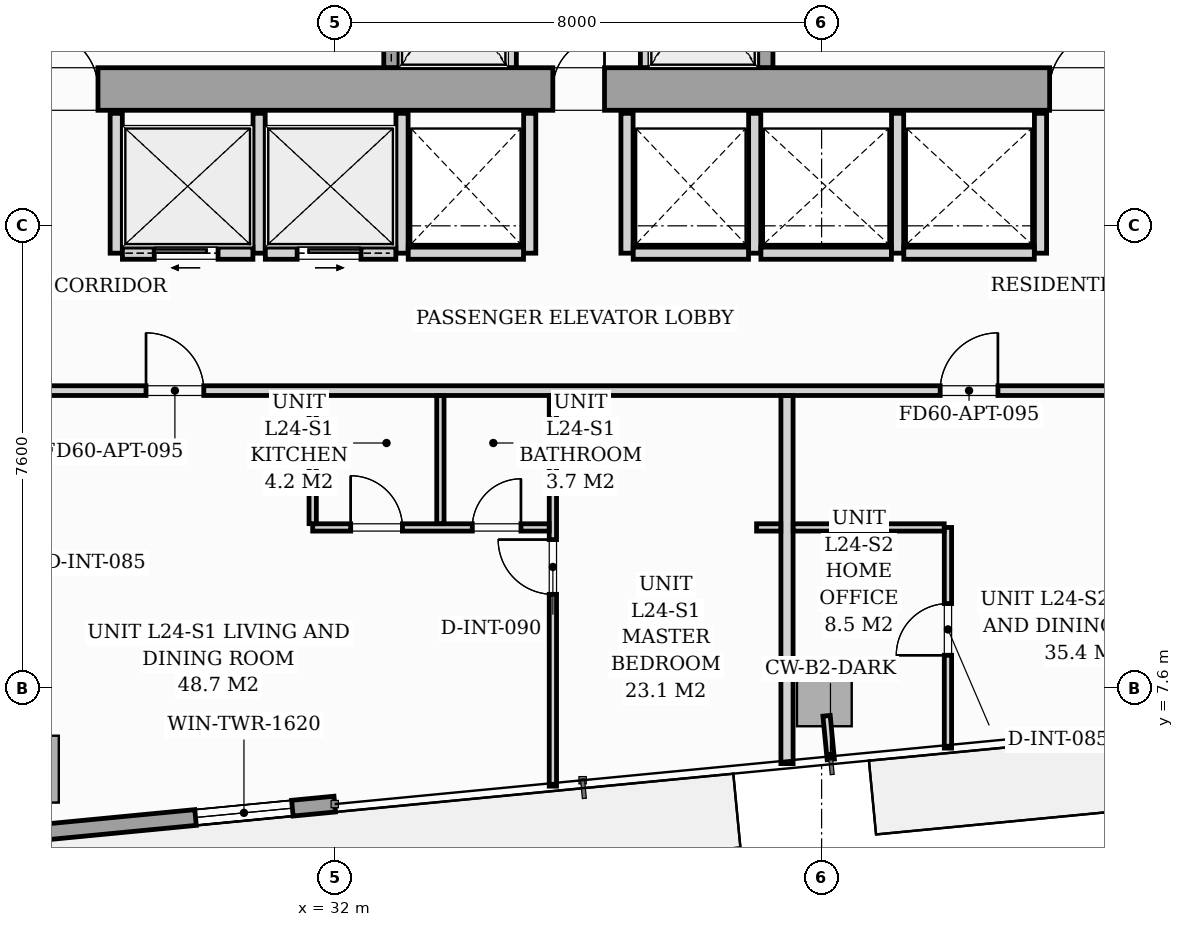
"""IFC4 building model, lengths in metres.
Left out: names, types, materials, properties, quantities, classifications, styles, units other than length and angle.
Written with IfcOpenShell. Run it as: python <this file> out.ifc"""

import sys

from ifc_helpers import new_model, si_unit, direction, frame, frame_2d, origin, origin_2d, place, context, subcontext, project, spatial, rectangle, i_section, extrude, source, transform, mapped, element, fill, save


model = new_model("IFC4")
c1 = context("Model", 3, precision=1e-05, world=origin(), true_north=direction((0.0, 1.0)))
c2 = subcontext(c1, "Body", "Model", "MODEL_VIEW")
j1 = project(units=[si_unit("LENGTHUNIT", "METRE"), si_unit("PLANEANGLEUNIT", "RADIAN")], contexts=[c1])
p1 = place(None, origin())
s1 = spatial("IfcSite", under=j1, at=p1, CompositionType="ELEMENT")
p2 = place(p1, origin())
s2 = spatial("IfcBuilding", under=s1, at=p2, CompositionType="ELEMENT")
p3 = place(p2, frame((0.0, 0.0, 87.4)))
s3 = spatial("IfcBuildingStorey", under=s2, at=p3, CompositionType="ELEMENT", Elevation=87.4)
m1 = source(origin(), c2, "Body", "SweptSolid", [
    extrude(i_section(OverallWidth=0.427, OverallDepth=0.483, WebThickness=0.051, FlangeThickness=0.082, FilletRadius=0.018, at=origin_2d()), origin(), (0.0, 0.0, 1.0), 3.196),
])
for number, where, z_axis, x_axis in (
    (1, (33.12, 17.4, 0.002), (0.0, 0.0, 1.0), (1.0, 0.0, 0.0)),
    (2, (38.88, 17.4, 0.002), (0.0, 0.0, 1.0), (1.0, 0.0, 0.0)),
):
    element("IfcColumn", number, at=place(p3, frame(where, z_axis=z_axis, x_axis=x_axis)), inside=s3, PredefinedType="PILASTER", context=c2, shape_type="MappedRepresentation", body=[
        mapped(m1, transform((0.0, 0.0, 0.0), scale=1.0)),
    ])
m2 = source(origin(), c2, "Body", "SweptSolid", [
    extrude(rectangle(XDim=0.9, YDim=1.1, at=origin_2d()), origin(), (0.0, 0.0, 1.0), 3.196),
])
for number, where, z_axis, x_axis in (
    (3, (27.006, 6.265, 0.002), (0.0, 0.0, 1.0), (0.995, 0.096, 0.0)),
    (4, (40.045, 7.521, 0.002), (0.0, 0.0, 1.0), (0.995, 0.096, 0.0)),
):
    element("IfcColumn", number, at=place(p3, frame(where, z_axis=z_axis, x_axis=x_axis)), inside=s3, PredefinedType="COLUMN", context=c2, shape_type="MappedRepresentation", body=[
        mapped(m2, transform((0.0, 0.0, 0.0), scale=1.0)),
    ])
p4 = place(p3, frame((31.994, 5.69, 0.0), z_axis=(0.0, 0.0, 1.0), x_axis=(-0.995396521236, -0.095842399342, 0.0)))
e5 = element("IfcWall", 5, at=p4, inside=s3, PredefinedType="STANDARD", context=c2, shape_type="SweptSolid", body=[
    extrude(rectangle(XDim=19.11, YDim=0.26, at=frame_2d((9.555, 0.0))), origin(), (0.0, 0.0, 1.0), 2.94),
])
p5 = place(p4, frame((7.49, 0.0, 0.0)))
e6 = element("IfcOpeningElement", 6, at=p5, cuts=e5, PredefinedType="OPENING", context=c2, shape_type="SweptSolid", body=[
    extrude(rectangle(XDim=1.8, YDim=2.06, at=frame_2d((0.9, 1.03))), frame((0.0, 0.14, 0.0), z_axis=(0.0, -1.0, 0.0), x_axis=(1.0, 0.0, 0.0)), (0.0, 0.0, 1.0), 0.28),
])
p6 = place(p4, frame((0.7, 0.0, 0.65)))
e7 = element("IfcOpeningElement", 7, at=p6, cuts=e5, PredefinedType="OPENING", context=c2, shape_type="SweptSolid", body=[
    extrude(rectangle(XDim=1.6, YDim=1.5, at=frame_2d((0.8, 0.75))), frame((0.0, 0.14, 0.0), z_axis=(0.0, -1.0, 0.0), x_axis=(1.0, 0.0, 0.0)), (0.0, 0.0, 1.0), 0.28),
])
p7 = place(p3, frame((26.1, 17.45, 0.0), z_axis=(0.0, 0.0, 1.0), x_axis=(1.0, 0.0, 0.0)))
e8 = element("IfcWall", 8, at=p7, inside=s3, PredefinedType="SHEAR", context=c2, shape_type="SweptSolid", body=[
    extrude(rectangle(XDim=19.8, YDim=0.7, at=frame_2d((9.9, 0.0))), origin(), (0.0, 0.0, 1.0), 3.2),
])
p8 = place(p7, frame((1.05, 0.0, 0.0)))
e9 = element("IfcOpeningElement", 9, at=p8, cuts=e8, PredefinedType="OPENING", context=c2, shape_type="SweptSolid", body=[
    extrude(rectangle(XDim=0.95, YDim=2.06, at=frame_2d((0.475, 1.03))), frame((0.0, 0.36, 0.0), z_axis=(0.0, -1.0, 0.0), x_axis=(1.0, 0.0, 0.0)), (0.0, 0.0, 1.0), 0.72),
])
p9 = place(p7, frame((9.48, 0.0, 0.0)))
e10 = element("IfcOpeningElement", 10, at=p9, cuts=e8, PredefinedType="OPENING", context=c2, shape_type="SweptSolid", body=[
    extrude(rectangle(XDim=0.85, YDim=2.0, at=frame_2d((0.425, 1.0))), frame((0.0, 0.36, 0.0), z_axis=(0.0, -1.0, 0.0), x_axis=(1.0, 0.0, 0.0)), (0.0, 0.0, 1.0), 0.72),
])
p10 = place(p7, frame((17.65, 0.0, 0.0)))
e11 = element("IfcOpeningElement", 11, at=p10, cuts=e8, PredefinedType="OPENING", context=c2, shape_type="SweptSolid", body=[
    extrude(rectangle(XDim=0.95, YDim=2.06, at=frame_2d((0.475, 1.03))), frame((0.0, 0.36, 0.0), z_axis=(0.0, -1.0, 0.0), x_axis=(1.0, 0.0, 0.0)), (0.0, 0.0, 1.0), 0.72),
])
p11 = place(p3, frame((32.925, 17.802, 0.0), z_axis=(0.0, 0.0, 1.0), x_axis=(0.0, 1.0, 0.0)))
e12 = element("IfcWall", 12, at=p11, inside=s3, PredefinedType="SOLIDWALL", context=c2, shape_type="SweptSolid", body=[
    extrude(rectangle(XDim=2.646, YDim=0.25, at=frame_2d((1.323, 0.0))), origin(), (0.0, 0.0, 1.0), 3.2),
])
p12 = place(p11, frame((0.598, 0.0, 0.0)))
e13 = element("IfcOpeningElement", 13, at=p12, cuts=e12, PredefinedType="OPENING", context=c2, shape_type="SweptSolid", body=[
    extrude(rectangle(XDim=1.1, YDim=2.08, at=frame_2d((0.55, 1.04))), frame((0.0, 0.135, 0.0), z_axis=(0.0, -1.0, 0.0), x_axis=(1.0, 0.0, 0.0)), (0.0, 0.0, 1.0), 0.27),
])
for number, where, z_axis, x_axis in (
    (14, (34.9, 17.802, 0.0), (0.0, 0.0, 1.0), (0.0, 1.0, 0.0)),
    (15, (37.1, 17.802, 0.0), (0.0, 0.0, 1.0), (0.0, 1.0, 0.0)),
):
    element("IfcWall", number, at=place(p3, frame(where, z_axis=z_axis, x_axis=x_axis)), inside=s3, PredefinedType="PARTITIONING", context=c2, shape_type="SweptSolid", body=[
        extrude(rectangle(XDim=2.646, YDim=0.16, at=frame_2d((1.323, 0.0))), origin(), (0.0, 0.0, 1.0), 2.94),
    ])
p13 = place(p3, frame((39.075, 17.802, 0.0), z_axis=(0.0, 0.0, 1.0), x_axis=(0.0, 1.0, 0.0)))
e16 = element("IfcWall", 16, at=p13, inside=s3, PredefinedType="SOLIDWALL", context=c2, shape_type="SweptSolid", body=[
    extrude(rectangle(XDim=2.646, YDim=0.25, at=frame_2d((1.323, 0.0))), origin(), (0.0, 0.0, 1.0), 3.2),
])
p14 = place(p13, frame((0.598, 0.0, 0.0)))
e17 = element("IfcOpeningElement", 17, at=p14, cuts=e16, PredefinedType="OPENING", context=c2, shape_type="SweptSolid", body=[
    extrude(rectangle(XDim=1.1, YDim=2.08, at=frame_2d((0.55, 1.04))), frame((0.0, 0.135, 0.0), z_axis=(0.0, -1.0, 0.0), x_axis=(1.0, 0.0, 0.0)), (0.0, 0.0, 1.0), 0.27),
])
for number, where, z_axis, x_axis in (
    (18, (28.4, 14.75, 0.0), (0.0, 0.0, 1.0), (0.0, 1.0, 0.0)),
    (19, (30.75, 14.75, 0.0), (0.0, 0.0, 1.0), (0.0, 1.0, 0.0)),
    (20, (33.1, 14.75, 0.0), (0.0, 0.0, 1.0), (0.0, 1.0, 0.0)),
):
    element("IfcWall", number, at=place(p3, frame(where, z_axis=z_axis, x_axis=x_axis)), inside=s3, PredefinedType="PARTITIONING", context=c2, shape_type="SweptSolid", body=[
        extrude(rectangle(XDim=2.3, YDim=0.2, at=frame_2d((1.15, 0.0))), origin(), (0.0, 0.0, 1.0), 2.94),
    ])
p15 = place(p3, frame((28.502, 14.75, 0.0), z_axis=(0.0, 0.0, 1.0), x_axis=(1.0, 0.0, 0.0)))
e21 = element("IfcWall", 21, at=p15, inside=s3, PredefinedType="PARTITIONING", context=c2, shape_type="SweptSolid", body=[
    extrude(rectangle(XDim=2.146, YDim=0.2, at=frame_2d((1.073, 0.0))), origin(), (0.0, 0.0, 1.0), 2.94),
])
p16 = place(p15, frame((0.523, 0.0, 0.0)))
e22 = element("IfcOpeningElement", 22, at=p16, cuts=e21, PredefinedType="OPENING", context=c2, shape_type="SweptSolid", body=[
    extrude(rectangle(XDim=1.05, YDim=2.08, at=frame_2d((0.525, 1.04))), frame((0.0, 0.11, 0.0), z_axis=(0.0, -1.0, 0.0), x_axis=(1.0, 0.0, 0.0)), (0.0, 0.0, 1.0), 0.22),
])
p17 = place(p3, frame((30.852, 14.75, 0.0), z_axis=(0.0, 0.0, 1.0), x_axis=(1.0, 0.0, 0.0)))
e23 = element("IfcWall", 23, at=p17, inside=s3, PredefinedType="PARTITIONING", context=c2, shape_type="SweptSolid", body=[
    extrude(rectangle(XDim=2.146, YDim=0.2, at=frame_2d((1.073, 0.0))), origin(), (0.0, 0.0, 1.0), 2.94),
])
p18 = place(p17, frame((0.523, 0.0, 0.0)))
e24 = element("IfcOpeningElement", 24, at=p18, cuts=e23, PredefinedType="OPENING", context=c2, shape_type="SweptSolid", body=[
    extrude(rectangle(XDim=1.05, YDim=2.08, at=frame_2d((0.525, 1.04))), frame((0.0, 0.11, 0.0), z_axis=(0.0, -1.0, 0.0), x_axis=(1.0, 0.0, 0.0)), (0.0, 0.0, 1.0), 0.22),
])
p19 = place(p3, frame((35.2, 14.75, 0.0), z_axis=(0.0, 0.0, 1.0), x_axis=(0.0, 1.0, 0.0)))
e25 = element("IfcWall", 25, at=p19, inside=s3, PredefinedType="PARTITIONING", context=c2, shape_type="SweptSolid", body=[
    extrude(rectangle(XDim=2.3, YDim=0.2, at=frame_2d((1.15, 0.0))), origin(), (0.0, 0.0, 1.0), 2.94),
])
p20 = place(p3, frame((33.202, 14.75, 0.0), z_axis=(0.0, 0.0, 1.0), x_axis=(1.0, 0.0, 0.0)))
e26 = element("IfcWall", 26, at=p20, inside=s3, PredefinedType="PARTITIONING", context=c2, shape_type="SweptSolid", body=[
    extrude(rectangle(XDim=1.896, YDim=0.2, at=frame_2d((0.948, 0.0))), origin(), (0.0, 0.0, 1.0), 2.94),
])
for number, where, z_axis, x_axis in (
    (27, (36.8, 14.75, 0.0), (0.0, 0.0, 1.0), (0.0, 1.0, 0.0)),
    (28, (38.9, 14.75, 0.0), (0.0, 0.0, 1.0), (0.0, 1.0, 0.0)),
):
    element("IfcWall", number, at=place(p3, frame(where, z_axis=z_axis, x_axis=x_axis)), inside=s3, PredefinedType="PARTITIONING", context=c2, shape_type="SweptSolid", body=[
        extrude(rectangle(XDim=2.3, YDim=0.2, at=frame_2d((1.15, 0.0))), origin(), (0.0, 0.0, 1.0), 2.94),
    ])
p21 = place(p3, frame((36.902, 14.75, 0.0), z_axis=(0.0, 0.0, 1.0), x_axis=(1.0, 0.0, 0.0)))
e29 = element("IfcWall", 29, at=p21, inside=s3, PredefinedType="PARTITIONING", context=c2, shape_type="SweptSolid", body=[
    extrude(rectangle(XDim=1.896, YDim=0.2, at=frame_2d((0.948, 0.0))), origin(), (0.0, 0.0, 1.0), 2.94),
])
for number, where, z_axis, x_axis in (
    (30, (41.25, 14.75, 0.0), (0.0, 0.0, 1.0), (0.0, 1.0, 0.0)),
    (31, (43.6, 14.75, 0.0), (0.0, 0.0, 1.0), (0.0, 1.0, 0.0)),
):
    element("IfcWall", number, at=place(p3, frame(where, z_axis=z_axis, x_axis=x_axis)), inside=s3, PredefinedType="PARTITIONING", context=c2, shape_type="SweptSolid", body=[
        extrude(rectangle(XDim=2.3, YDim=0.2, at=frame_2d((1.15, 0.0))), origin(), (0.0, 0.0, 1.0), 2.94),
    ])
for number, where, z_axis, x_axis in (
    (32, (39.002, 14.75, 0.0), (0.0, 0.0, 1.0), (1.0, 0.0, 0.0)),
    (33, (41.352, 14.75, 0.0), (0.0, 0.0, 1.0), (1.0, 0.0, 0.0)),
):
    element("IfcWall", number, at=place(p3, frame(where, z_axis=z_axis, x_axis=x_axis)), inside=s3, PredefinedType="PARTITIONING", context=c2, shape_type="SweptSolid", body=[
        extrude(rectangle(XDim=2.146, YDim=0.2, at=frame_2d((1.073, 0.0))), origin(), (0.0, 0.0, 1.0), 2.94),
    ])
p22 = place(p3, frame((17.7, 12.49, 0.0), z_axis=(0.0, 0.0, 1.0), x_axis=(1.0, 0.0, 0.0)))
e34 = element("IfcWall", 34, at=p22, inside=s3, PredefinedType="PARTITIONING", context=c2, shape_type="SweptSolid", body=[
    extrude(rectangle(XDim=35.4, YDim=0.16, at=frame_2d((17.7, 0.0))), origin(), (0.0, 0.0, 1.0), 2.94),
])
p23 = place(p22, frame((11.19, 0.0, 0.0)))
e35 = element("IfcOpeningElement", 35, at=p23, cuts=e34, PredefinedType="OPENING", context=c2, shape_type="SweptSolid", body=[
    extrude(rectangle(XDim=0.95, YDim=2.06, at=frame_2d((0.475, 1.03))), frame((0.0, 0.09, 0.0), z_axis=(0.0, -1.0, 0.0), x_axis=(1.0, 0.0, 0.0)), (0.0, 0.0, 1.0), 0.18),
])
p24 = place(p22, frame((24.25, 0.0, 0.0)))
e36 = element("IfcOpeningElement", 36, at=p24, cuts=e34, PredefinedType="OPENING", context=c2, shape_type="SweptSolid", body=[
    extrude(rectangle(XDim=0.95, YDim=2.06, at=frame_2d((0.475, 1.03))), frame((0.0, 0.09, 0.0), z_axis=(0.0, -1.0, 0.0), x_axis=(1.0, 0.0, 0.0)), (0.0, 0.0, 1.0), 0.18),
])
p25 = place(p3, frame((35.581, 5.986, 0.0), z_axis=(0.0, 0.0, 1.0), x_axis=(0.0, 1.0, 0.0)))
e37 = element("IfcWall", 37, at=p25, inside=s3, PredefinedType="PARTITIONING", context=c2, shape_type="SweptSolid", body=[
    extrude(rectangle(XDim=6.422, YDim=0.12, at=frame_2d((3.211, 0.0))), origin(), (0.0, 0.0, 1.0), 2.94),
])
p26 = place(p25, frame((3.154, 0.0, 0.0)))
e38 = element("IfcOpeningElement", 38, at=p26, cuts=e37, PredefinedType="OPENING", context=c2, shape_type="SweptSolid", body=[
    extrude(rectangle(XDim=0.9, YDim=2.05, at=frame_2d((0.45, 1.025))), frame((0.0, 0.07, 0.0), z_axis=(0.0, -1.0, 0.0), x_axis=(1.0, 0.0, 0.0)), (0.0, 0.0, 1.0), 0.14),
])
p27 = place(p3, frame((31.631, 10.24, 0.0), z_axis=(0.0, 0.0, 1.0), x_axis=(1.0, 0.0, 0.0)))
e39 = element("IfcWall", 39, at=p27, inside=s3, PredefinedType="PARTITIONING", context=c2, shape_type="SweptSolid", body=[
    extrude(rectangle(XDim=3.888, YDim=0.12, at=frame_2d((1.944, 0.0))), origin(), (0.0, 0.0, 1.0), 2.94),
])
p28 = place(p27, frame((0.625, 0.0, 0.0)))
e40 = element("IfcOpeningElement", 40, at=p28, cuts=e39, PredefinedType="OPENING", context=c2, shape_type="SweptSolid", body=[
    extrude(rectangle(XDim=0.85, YDim=2.05, at=frame_2d((0.425, 1.025))), frame((0.0, 0.07, 0.0), z_axis=(0.0, -1.0, 0.0), x_axis=(1.0, 0.0, 0.0)), (0.0, 0.0, 1.0), 0.14),
])
p29 = place(p27, frame((2.625, 0.0, 0.0)))
e41 = element("IfcOpeningElement", 41, at=p29, cuts=e39, PredefinedType="OPENING", context=c2, shape_type="SweptSolid", body=[
    extrude(rectangle(XDim=0.8, YDim=2.02, at=frame_2d((0.4, 1.01))), frame((0.0, 0.07, 0.0), z_axis=(0.0, -1.0, 0.0), x_axis=(1.0, 0.0, 0.0)), (0.0, 0.0, 1.0), 0.14),
])
for number, where, z_axis, x_axis in (
    (42, (33.731, 10.302, 0.0), (0.0, 0.0, 1.0), (0.0, 1.0, 0.0)),
    (43, (31.631, 10.302, 0.0), (0.0, 0.0, 1.0), (0.0, 1.0, 0.0)),
):
    element("IfcWall", number, at=place(p3, frame(where, z_axis=z_axis, x_axis=x_axis)), inside=s3, PredefinedType="PARTITIONING", context=c2, shape_type="SweptSolid", body=[
        extrude(rectangle(XDim=2.106, YDim=0.12, at=frame_2d((1.053, 0.0))), origin(), (0.0, 0.0, 1.0), 2.94),
    ])
p30 = place(p3, frame((39.431, 6.356, 0.0), z_axis=(0.0, 0.0, 1.0), x_axis=(0.0, 1.0, 0.0)))
e44 = element("IfcWall", 44, at=p30, inside=s3, PredefinedType="PARTITIONING", context=c2, shape_type="SweptSolid", body=[
    extrude(rectangle(XDim=6.052, YDim=0.2, at=frame_2d((3.026, 0.0))), origin(), (0.0, 0.0, 1.0), 2.94),
])
p31 = place(p3, frame((42.078, 6.611, 0.0), z_axis=(0.0, 0.0, 1.0), x_axis=(0.0, 1.0, 0.0)))
e45 = element("IfcWall", 45, at=p31, inside=s3, PredefinedType="PARTITIONING", context=c2, shape_type="SweptSolid", body=[
    extrude(rectangle(XDim=3.629, YDim=0.12, at=frame_2d((1.814, 0.0))), origin(), (0.0, 0.0, 1.0), 2.94),
])
p32 = place(p31, frame((1.527, 0.0, 0.0)))
e46 = element("IfcOpeningElement", 46, at=p32, cuts=e45, PredefinedType="OPENING", context=c2, shape_type="SweptSolid", body=[
    extrude(rectangle(XDim=0.85, YDim=2.05, at=frame_2d((0.425, 1.025))), frame((0.0, 0.07, 0.0), z_axis=(0.0, -1.0, 0.0), x_axis=(1.0, 0.0, 0.0)), (0.0, 0.0, 1.0), 0.14),
])
p33 = place(p3, frame((38.931, 10.24, 0.0), z_axis=(0.0, 0.0, 1.0), x_axis=(1.0, 0.0, 0.0)))
e47 = element("IfcWall", 47, at=p33, inside=s3, PredefinedType="PARTITIONING", context=c2, shape_type="SweptSolid", body=[
    extrude(rectangle(XDim=0.398, YDim=0.12, at=frame_2d((0.199, 0.0))), origin(), (0.0, 0.0, 1.0), 2.94),
])
p34 = place(p3, frame((39.533, 10.24, 0.0), z_axis=(0.0, 0.0, 1.0), x_axis=(1.0, 0.0, 0.0)))
e48 = element("IfcWall", 48, at=p34, inside=s3, PredefinedType="PARTITIONING", context=c2, shape_type="SweptSolid", body=[
    extrude(rectangle(XDim=2.483, YDim=0.12, at=frame_2d((1.242, 0.0))), origin(), (0.0, 0.0, 1.0), 2.94),
])
p35 = place(p3, frame((40.082, 7.142, 0.0), z_axis=(0.0, 0.0, 1.0), x_axis=(0.095944965663, -0.995386640238, 0.0)))
e49 = element("IfcWall", 49, at=p35, inside=s3, PredefinedType="PARTITIONING", context=c2, shape_type="SweptSolid", body=[
    extrude(rectangle(XDim=0.72, YDim=0.12, at=frame_2d((0.36, 0.0))), origin(), (0.0, 0.0, 1.0), 2.94),
])
m3 = source(origin(), c2, "Body", "SweptSolid", [
    extrude(rectangle(XDim=1.6, YDim=1.5, at=frame_2d((0.8, 0.75))), frame((0.0, 0.03, 0.0), z_axis=(0.0, -1.0, 0.0), x_axis=(1.0, 0.0, 0.0)), (0.0, 0.0, 1.0), 0.06),
])
p36 = place(p6, origin())
e50 = element("IfcWindow", 50, at=p36, inside=s3, PartitioningType="SINGLE_PANEL", PredefinedType="WINDOW", context=c2, shape_type="MappedRepresentation", body=[
    mapped(m3, transform((0.0, 0.0, 0.0), scale=1.0)),
])
fill(e7, e50)
m4 = source(origin(), c2, "Body", "SweptSolid", [
    extrude(rectangle(XDim=0.95, YDim=2.06, at=frame_2d((0.475, 1.03))), frame((0.0, 0.025, 0.0), z_axis=(0.0, -1.0, 0.0), x_axis=(1.0, 0.0, 0.0)), (0.0, 0.0, 1.0), 0.05),
])
p37 = place(p8, origin())
e51 = element("IfcDoor", 51, at=p37, inside=s3, OperationType="SINGLE_SWING_LEFT", PredefinedType="DOOR", context=c2, shape_type="MappedRepresentation", body=[
    mapped(m4, transform((0.0, 0.0, 0.0), scale=1.0)),
])
fill(e9, e51)
m5 = source(origin(), c2, "Body", "SweptSolid", [
    extrude(rectangle(XDim=0.85, YDim=2.0, at=frame_2d((0.425, 1.0))), frame((0.0, 0.025, 0.0), z_axis=(0.0, -1.0, 0.0), x_axis=(1.0, 0.0, 0.0)), (0.0, 0.0, 1.0), 0.05),
])
p38 = place(p9, origin())
e52 = element("IfcDoor", 52, at=p38, inside=s3, OperationType="SINGLE_SWING_RIGHT", PredefinedType="DOOR", context=c2, shape_type="MappedRepresentation", body=[
    mapped(m5, transform((0.0, 0.0, 0.0), scale=1.0)),
])
fill(e10, e52)
p39 = place(p10, origin())
e53 = element("IfcDoor", 53, at=p39, inside=s3, OperationType="SINGLE_SWING_RIGHT", PredefinedType="DOOR", context=c2, shape_type="MappedRepresentation", body=[
    mapped(m4, transform((0.0, 0.0, 0.0), scale=1.0)),
])
fill(e11, e53)
m6 = source(origin(), c2, "Body", "SweptSolid", [
    extrude(rectangle(XDim=1.05, YDim=2.08, at=frame_2d((0.525, 1.04))), frame((0.0, 0.025, 0.0), z_axis=(0.0, -1.0, 0.0), x_axis=(1.0, 0.0, 0.0)), (0.0, 0.0, 1.0), 0.05),
])
p40 = place(p16, origin())
e54 = element("IfcDoor", 54, at=p40, inside=s3, OperationType="SLIDING_TO_LEFT", PredefinedType="DOOR", context=c2, shape_type="MappedRepresentation", body=[
    mapped(m6, transform((0.0, 0.0, 0.0), scale=1.0)),
])
fill(e22, e54)
p41 = place(p18, origin())
e55 = element("IfcDoor", 55, at=p41, inside=s3, OperationType="SLIDING_TO_RIGHT", PredefinedType="DOOR", context=c2, shape_type="MappedRepresentation", body=[
    mapped(m6, transform((0.0, 0.0, 0.0), scale=1.0)),
])
fill(e24, e55)
m7 = source(origin(), c2, "Body", "SweptSolid", [
    extrude(rectangle(XDim=0.95, YDim=2.06, at=frame_2d((0.475, 1.03))), frame((0.0, 0.025, 0.0), z_axis=(0.0, -1.0, 0.0), x_axis=(1.0, 0.0, 0.0)), (0.0, 0.0, 1.0), 0.05),
])
p42 = place(p23, origin())
e56 = element("IfcDoor", 56, at=p42, inside=s3, OperationType="SINGLE_SWING_LEFT", PredefinedType="DOOR", context=c2, shape_type="MappedRepresentation", body=[
    mapped(m7, transform((0.0, 0.0, 0.0), scale=1.0)),
])
fill(e35, e56)
m8 = source(origin(), c2, "Body", "SweptSolid", [
    extrude(rectangle(XDim=0.9, YDim=2.05, at=frame_2d((0.45, 1.025))), frame((0.0, 0.025, 0.0), z_axis=(0.0, -1.0, 0.0), x_axis=(1.0, 0.0, 0.0)), (0.0, 0.0, 1.0), 0.05),
])
p43 = place(p26, origin())
e57 = element("IfcDoor", 57, at=p43, inside=s3, OperationType="SINGLE_SWING_RIGHT", PredefinedType="DOOR", context=c2, shape_type="MappedRepresentation", body=[
    mapped(m8, transform((0.0, 0.0, 0.0), scale=1.0)),
])
fill(e38, e57)
m9 = source(origin(), c2, "Body", "SweptSolid", [
    extrude(rectangle(XDim=0.85, YDim=2.05, at=frame_2d((0.425, 1.025))), frame((0.0, 0.025, 0.0), z_axis=(0.0, -1.0, 0.0), x_axis=(1.0, 0.0, 0.0)), (0.0, 0.0, 1.0), 0.05),
])
p44 = place(p28, origin())
e58 = element("IfcDoor", 58, at=p44, inside=s3, OperationType="SINGLE_SWING_LEFT", PredefinedType="DOOR", context=c2, shape_type="MappedRepresentation", body=[
    mapped(m9, transform((0.0, 0.0, 0.0), scale=1.0)),
])
fill(e40, e58)
m10 = source(origin(), c2, "Body", "SweptSolid", [
    extrude(rectangle(XDim=0.8, YDim=2.02, at=frame_2d((0.4, 1.01))), frame((0.0, 0.025, 0.0), z_axis=(0.0, -1.0, 0.0), x_axis=(1.0, 0.0, 0.0)), (0.0, 0.0, 1.0), 0.05),
])
p45 = place(p29, origin())
e59 = element("IfcDoor", 59, at=p45, inside=s3, OperationType="SINGLE_SWING_RIGHT", PredefinedType="DOOR", context=c2, shape_type="MappedRepresentation", body=[
    mapped(m10, transform((0.0, 0.0, 0.0), scale=1.0)),
])
fill(e41, e59)
p46 = place(p32, origin())
e60 = element("IfcDoor", 60, at=p46, inside=s3, OperationType="SINGLE_SWING_LEFT", PredefinedType="DOOR", context=c2, shape_type="MappedRepresentation", body=[
    mapped(m9, transform((0.0, 0.0, 0.0), scale=1.0)),
])
fill(e46, e60)
p47 = place(p24, origin())
e61 = element("IfcDoor", 61, at=p47, inside=s3, OperationType="SINGLE_SWING_RIGHT", PredefinedType="DOOR", context=c2, shape_type="MappedRepresentation", body=[
    mapped(m7, transform((0.0, 0.0, 0.0), scale=1.0)),
])
fill(e36, e61)
save(model, sys.argv[1])
